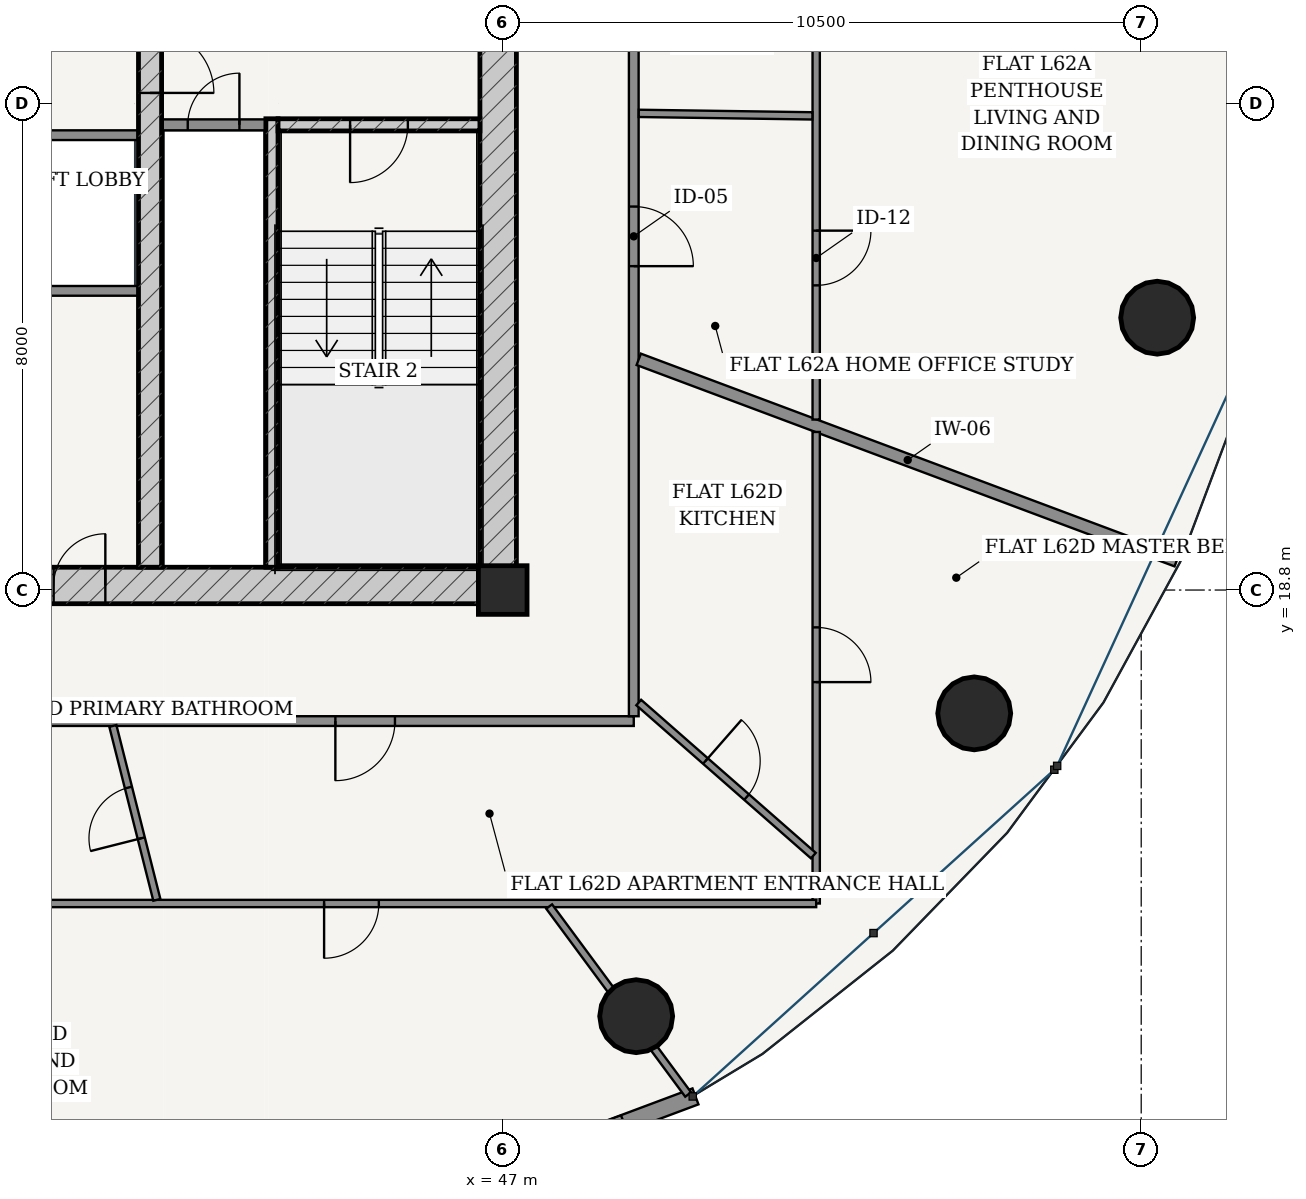
"""IFC4 building model, lengths in metres.
Left out: names, types, materials, properties, quantities, classifications, styles, units other than length and angle.
Written with IfcOpenShell. Run it as: python <this file> out.ifc"""

import sys

from ifc_helpers import new_model, si_unit, direction, frame, frame_2d, origin, origin_2d, place, context, subcontext, project, spatial, rectangle, hollow_circle, extrude, source, transform, mapped, element, fill, save


model = new_model("IFC4")
c1 = context("Model", 3, precision=1e-05, world=origin(), true_north=direction((-0.2419218956, 0.970295726276)))
c2 = subcontext(c1, "Body", "Model", "MODEL_VIEW")
j1 = project(units=[si_unit("LENGTHUNIT", "METRE"), si_unit("PLANEANGLEUNIT", "RADIAN")], contexts=[c1])
p1 = place(None, origin())
s1 = spatial("IfcSite", under=j1, at=p1, CompositionType="ELEMENT")
p2 = place(p1, origin())
s2 = spatial("IfcBuilding", under=s1, at=p2, CompositionType="ELEMENT")
p3 = place(p2, frame((0.0, 0.0, 235.6)))
s3 = spatial("IfcBuildingStorey", under=s2, at=p3, CompositionType="ELEMENT", Elevation=235.6)
p4 = place(p3, frame((47.0, 18.8, 0.0), z_axis=(0.0, 0.0, 1.0), x_axis=(1.0, 0.0, 0.0)))
e1 = element("IfcColumn", 1, at=p4, inside=s3, PredefinedType="COLUMN", context=c2, shape_type="SweptSolid", body=[
    extrude(rectangle(XDim=0.8, YDim=0.8, at=origin_2d()), origin(), (0.0, 0.0, 1.0), 3.7),
])
p5 = place(p3, frame((28.775, 18.875, 0.0), z_axis=(0.0, 0.0, 1.0), x_axis=(1.0, 0.0, 0.0)))
e2 = element("IfcWall", 2, at=p5, inside=s3, PredefinedType="SHEAR", context=c2, shape_type="SweptSolid", body=[
    extrude(rectangle(XDim=18.45, YDim=0.6, at=frame_2d((9.225, 0.0))), origin(), (0.0, 0.0, 1.0), 3.435),
])
p6 = place(p5, frame((6.76, 0.0, 0.0)))
e3 = element("IfcOpeningElement", 3, at=p6, cuts=e2, PredefinedType="OPENING", context=c2, shape_type="SweptSolid", body=[
    extrude(rectangle(XDim=0.85, YDim=2.1, at=frame_2d((0.425, 1.05))), frame((0.0, 0.31, 0.0), z_axis=(0.0, -1.0, 0.0), x_axis=(1.0, 0.0, 0.0)), (0.0, 0.0, 1.0), 0.62),
])
p7 = place(p5, frame((8.8, 0.0, 0.0)))
e4 = element("IfcOpeningElement", 4, at=p7, cuts=e2, PredefinedType="OPENING", context=c2, shape_type="SweptSolid", body=[
    extrude(rectangle(XDim=0.85, YDim=2.1, at=frame_2d((0.425, 1.05))), frame((0.0, 0.31, 0.0), z_axis=(0.0, -1.0, 0.0), x_axis=(1.0, 0.0, 0.0)), (0.0, 0.0, 1.0), 0.62),
])
p8 = place(p5, frame((10.84, 0.0, 0.0)))
e5 = element("IfcOpeningElement", 5, at=p8, cuts=e2, PredefinedType="OPENING", context=c2, shape_type="SweptSolid", body=[
    extrude(rectangle(XDim=0.85, YDim=2.1, at=frame_2d((0.425, 1.05))), frame((0.0, 0.31, 0.0), z_axis=(0.0, -1.0, 0.0), x_axis=(1.0, 0.0, 0.0)), (0.0, 0.0, 1.0), 0.62),
])
p9 = place(p3, frame((46.925, 19.175, 0.0), z_axis=(0.0, 0.0, 1.0), x_axis=(0.0, 1.0, 0.0)))
e6 = element("IfcWall", 6, at=p9, inside=s3, PredefinedType="SHEAR", context=c2, shape_type="SweptSolid", body=[
    extrude(rectangle(XDim=15.25, YDim=0.6, at=frame_2d((7.625, 0.0))), origin(), (0.0, 0.0, 1.0), 3.435),
])
p10 = place(p9, frame((9.875, 0.0, 0.0)))
e7 = element("IfcOpeningElement", 7, at=p10, cuts=e6, PredefinedType="OPENING", context=c2, shape_type="SweptSolid", body=[
    extrude(rectangle(XDim=1.5, YDim=2.2, at=frame_2d((0.75, 1.1))), frame((0.0, 0.31, 0.0), z_axis=(0.0, -1.0, 0.0), x_axis=(1.0, 0.0, 0.0)), (0.0, 0.0, 1.0), 0.62),
])
p11 = place(p3, frame((43.205, 19.175, 0.0), z_axis=(0.0, 0.0, 1.0), x_axis=(0.0, 1.0, 0.0)))
e8 = element("IfcWall", 8, at=p11, inside=s3, PredefinedType="SOLIDWALL", context=c2, shape_type="SweptSolid", body=[
    extrude(rectangle(XDim=7.375, YDim=0.2, at=frame_2d((3.688, 0.0))), origin(), (0.0, 0.0, 1.0), 3.435),
])
p12 = place(p3, frame((43.305, 26.45, 0.0), z_axis=(0.0, 0.0, 1.0), x_axis=(1.0, 0.0, 0.0)))
e9 = element("IfcWall", 9, at=p12, inside=s3, PredefinedType="SOLIDWALL", context=c2, shape_type="SweptSolid", body=[
    extrude(rectangle(XDim=3.32, YDim=0.2, at=frame_2d((1.66, 0.0))), origin(), (0.0, 0.0, 1.0), 3.435),
])
p13 = place(p12, frame((1.185, 0.0, 0.0)))
e10 = element("IfcOpeningElement", 10, at=p13, cuts=e9, PredefinedType="OPENING", context=c2, shape_type="SweptSolid", body=[
    extrude(rectangle(XDim=0.95, YDim=2.15, at=frame_2d((0.475, 1.075))), frame((0.0, 0.11, 0.0), z_axis=(0.0, -1.0, 0.0), x_axis=(1.0, 0.0, 0.0)), (0.0, 0.0, 1.0), 0.22),
])
p14 = place(p3, frame((41.2, 19.175, 0.0), z_axis=(0.0, 0.0, 1.0), x_axis=(0.0, 1.0, 0.0)))
e11 = element("IfcWall", 11, at=p14, inside=s3, PredefinedType="SHEAR", context=c2, shape_type="SweptSolid", body=[
    extrude(rectangle(XDim=15.25, YDim=0.38, at=frame_2d((7.625, 0.0))), origin(), (0.0, 0.0, 1.0), 3.435),
])
p15 = place(p14, frame((7.8, 0.0, 0.0)))
e12 = element("IfcOpeningElement", 12, at=p15, cuts=e11, PredefinedType="OPENING", context=c2, shape_type="SweptSolid", body=[
    extrude(rectangle(XDim=1.05, YDim=2.15, at=frame_2d((0.525, 1.075))), frame((0.0, 0.2, 0.0), z_axis=(0.0, -1.0, 0.0), x_axis=(1.0, 0.0, 0.0)), (0.0, 0.0, 1.0), 0.4),
])
for number, where, z_axis, x_axis in (
    (13, (49.195, 11.792, 0.0), (0.0, 0.0, 1.0), (1.0, 0.0, 0.0)),
    (14, (54.754, 16.772, 0.0), (0.0, 0.0, 1.0), (1.0, 0.0, 0.0)),
    (15, (57.763, 23.279, 0.0), (0.0, 0.0, 1.0), (1.0, 0.0, 0.0)),
):
    element("IfcColumn", number, at=place(p3, frame(where, z_axis=z_axis, x_axis=x_axis)), inside=s3, PredefinedType="COLUMN", context=c2, shape_type="SweptSolid", body=[
        extrude(hollow_circle(Radius=0.6, WallThickness=0.038, at=origin_2d()), origin(), (0.0, 0.0, 1.0), 3.7),
    ])
p16 = place(p3, frame((42.172, 7.48, 0.0), z_axis=(0.0, 0.0, 1.0), x_axis=(0.936556918375, 0.350515532672, 0.0)))
e16 = element("IfcWall", 16, at=p16, inside=s3, PredefinedType="SOLIDWALL", context=c2, shape_type="SweptSolid", body=[
    extrude(rectangle(XDim=8.539, YDim=0.28, at=frame_2d((4.27, 0.0))), origin(), (0.0, 0.0, 1.0), 3.435),
])
p17 = place(p16, frame((1.256, 0.0, 0.85)))
e17 = element("IfcOpeningElement", 17, at=p17, cuts=e16, PredefinedType="OPENING", context=c2, shape_type="SweptSolid", body=[
    extrude(rectangle(XDim=2.1, YDim=1.95, at=frame_2d((1.05, 0.975))), frame((0.0, 0.15, 0.0), z_axis=(0.0, -1.0, 0.0), x_axis=(1.0, 0.0, 0.0)), (0.0, 0.0, 1.0), 0.3),
])
p18 = place(p16, frame((5.184, 0.0, 0.85)))
e18 = element("IfcOpeningElement", 18, at=p18, cuts=e16, PredefinedType="OPENING", context=c2, shape_type="SweptSolid", body=[
    extrude(rectangle(XDim=2.1, YDim=1.95, at=frame_2d((1.05, 0.975))), frame((0.0, 0.15, 0.0), z_axis=(0.0, -1.0, 0.0), x_axis=(1.0, 0.0, 0.0)), (0.0, 0.0, 1.0), 0.3),
])
p19 = place(p3, frame((41.39, 26.45, 0.0), z_axis=(0.0, 0.0, 1.0), x_axis=(1.0, 0.0, 0.0)))
e19 = element("IfcWall", 19, at=p19, inside=s3, PredefinedType="PARTITIONING", context=c2, shape_type="SweptSolid", body=[
    extrude(rectangle(XDim=1.71, YDim=0.18, at=frame_2d((0.855, 0.0))), origin(), (0.0, 0.0, 1.0), 3.435),
])
p20 = place(p19, frame((0.43, 0.0, 0.0)))
e20 = element("IfcOpeningElement", 20, at=p20, cuts=e19, PredefinedType="OPENING", context=c2, shape_type="SweptSolid", body=[
    extrude(rectangle(XDim=0.85, YDim=2.1, at=frame_2d((0.425, 1.05))), frame((0.0, 0.1, 0.0), z_axis=(0.0, -1.0, 0.0), x_axis=(1.0, 0.0, 0.0)), (0.0, 0.0, 1.0), 0.2),
])
p21 = place(p3, frame((34.99, 26.28, 0.0), z_axis=(0.0, 0.0, 1.0), x_axis=(1.0, 0.0, 0.0)))
e21 = element("IfcWall", 21, at=p21, inside=s3, PredefinedType="PARTITIONING", context=c2, shape_type="SweptSolid", body=[
    extrude(rectangle(XDim=6.02, YDim=0.16, at=frame_2d((3.01, 0.0))), origin(), (0.0, 0.0, 1.0), 3.435),
])
p22 = place(p21, frame((0.225, 0.0, 0.0)))
e22 = element("IfcOpeningElement", 22, at=p22, cuts=e21, PredefinedType="OPENING", context=c2, shape_type="SweptSolid", body=[
    extrude(rectangle(XDim=1.1, YDim=2.2, at=frame_2d((0.55, 1.1))), frame((0.0, 0.09, 0.0), z_axis=(0.0, -1.0, 0.0), x_axis=(1.0, 0.0, 0.0)), (0.0, 0.0, 1.0), 0.18),
])
p23 = place(p21, frame((1.705, 0.0, 0.0)))
e23 = element("IfcOpeningElement", 23, at=p23, cuts=e21, PredefinedType="OPENING", context=c2, shape_type="SweptSolid", body=[
    extrude(rectangle(XDim=1.1, YDim=2.2, at=frame_2d((0.55, 1.1))), frame((0.0, 0.09, 0.0), z_axis=(0.0, -1.0, 0.0), x_axis=(1.0, 0.0, 0.0)), (0.0, 0.0, 1.0), 0.18),
])
p24 = place(p3, frame((34.99, 23.72, 0.0), z_axis=(0.0, 0.0, 1.0), x_axis=(1.0, 0.0, 0.0)))
e24 = element("IfcWall", 24, at=p24, inside=s3, PredefinedType="PARTITIONING", context=c2, shape_type="SweptSolid", body=[
    extrude(rectangle(XDim=6.02, YDim=0.16, at=frame_2d((3.01, 0.0))), origin(), (0.0, 0.0, 1.0), 3.435),
])
p25 = place(p3, frame((34.32, 16.645, 0.0), z_axis=(0.0, 0.0, 1.0), x_axis=(1.0, 0.0, 0.0)))
e25 = element("IfcWall", 25, at=p25, inside=s3, PredefinedType="PARTITIONING", context=c2, shape_type="SweptSolid", body=[
    extrude(rectangle(XDim=14.835, YDim=0.16, at=frame_2d((7.417, 0.0))), origin(), (0.0, 0.0, 1.0), 2.951),
])
p26 = place(p25, frame((9.928, 0.0, 0.0)))
e26 = element("IfcOpeningElement", 26, at=p26, cuts=e25, PredefinedType="OPENING", context=c2, shape_type="SweptSolid", body=[
    extrude(rectangle(XDim=0.98, YDim=2.2, at=frame_2d((0.49, 1.1))), frame((0.0, 0.09, 0.0), z_axis=(0.0, -1.0, 0.0), x_axis=(1.0, 0.0, 0.0)), (0.0, 0.0, 1.0), 0.18),
])
p27 = place(p3, frame((49.155, 16.725, 0.0), z_axis=(0.0, 0.0, 1.0), x_axis=(0.0, 1.0, 0.0)))
e27 = element("IfcWall", 27, at=p27, inside=s3, PredefinedType="PARTITIONING", context=c2, shape_type="SweptSolid", body=[
    extrude(rectangle(XDim=18.3, YDim=0.16, at=frame_2d((9.15, 0.0))), origin(), (0.0, 0.0, 1.0), 2.951),
])
p28 = place(p27, frame((7.401, 0.0, 0.0)))
e28 = element("IfcOpeningElement", 28, at=p28, cuts=e27, PredefinedType="OPENING", context=c2, shape_type="SweptSolid", body=[
    extrude(rectangle(XDim=0.98, YDim=2.2, at=frame_2d((0.49, 1.1))), frame((0.0, 0.09, 0.0), z_axis=(0.0, -1.0, 0.0), x_axis=(1.0, 0.0, 0.0)), (0.0, 0.0, 1.0), 0.18),
])
p29 = place(p3, frame((49.237, 22.594, 0.0), z_axis=(0.0, 0.0, 1.0), x_axis=(0.936534016635, -0.350576718687, 0.0)))
e29 = element("IfcWall", 29, at=p29, inside=s3, PredefinedType="PARTITIONING", context=c2, shape_type="SweptSolid", body=[
    extrude(rectangle(XDim=9.446, YDim=0.2, at=frame_2d((4.723, 0.0))), origin(), (0.0, 0.0, 1.0), 2.951),
])
p30 = place(p3, frame((52.155, 38.105, 0.0), z_axis=(0.0, 0.0, 1.0), x_axis=(0.0, -1.0, 0.0)))
e30 = element("IfcWall", 30, at=p30, inside=s3, PredefinedType="PARTITIONING", context=c2, shape_type="SweptSolid", body=[
    extrude(rectangle(XDim=16.501, YDim=0.12, at=frame_2d((8.251, 0.0))), origin(), (0.0, 0.0, 1.0), 2.951),
])
p31 = place(p30, frame((13.395, 0.0, 0.0)))
e31 = element("IfcOpeningElement", 31, at=p31, cuts=e30, PredefinedType="OPENING", context=c2, shape_type="SweptSolid", body=[
    extrude(rectangle(XDim=0.9, YDim=2.15, at=frame_2d((0.45, 1.075))), frame((0.0, 0.07, 0.0), z_axis=(0.0, -1.0, 0.0), x_axis=(1.0, 0.0, 0.0)), (0.0, 0.0, 1.0), 0.14),
])
p32 = place(p30, frame((7.467, 0.0, 0.0)))
e32 = element("IfcOpeningElement", 32, at=p32, cuts=e30, PredefinedType="OPENING", context=c2, shape_type="SweptSolid", body=[
    extrude(rectangle(XDim=0.9, YDim=2.15, at=frame_2d((0.45, 1.075))), frame((0.0, 0.07, 0.0), z_axis=(0.0, -1.0, 0.0), x_axis=(1.0, 0.0, 0.0)), (0.0, 0.0, 1.0), 0.14),
])
p33 = place(p3, frame((49.237, 26.639, 0.0), z_axis=(0.0, 0.0, 1.0), x_axis=(0.999896890624, -0.014359948506, 0.0)))
e33 = element("IfcWall", 33, at=p33, inside=s3, PredefinedType="PARTITIONING", context=c2, shape_type="SweptSolid", body=[
    extrude(rectangle(XDim=2.856, YDim=0.12, at=frame_2d((1.428, 0.0))), origin(), (0.0, 0.0, 1.0), 3.435),
])
p34 = place(p3, frame((52.155, 21.4, 0.0), z_axis=(0.0, 0.0, 1.0), x_axis=(0.0, -1.0, 0.0)))
e34 = element("IfcWall", 34, at=p34, inside=s3, PredefinedType="PARTITIONING", context=c2, shape_type="SweptSolid", body=[
    extrude(rectangle(XDim=7.755, YDim=0.12, at=frame_2d((3.877, 0.0))), origin(), (0.0, 0.0, 1.0), 2.951),
])
p35 = place(p34, frame((3.214, 0.0, 0.0)))
e35 = element("IfcOpeningElement", 35, at=p35, cuts=e34, PredefinedType="OPENING", context=c2, shape_type="SweptSolid", body=[
    extrude(rectangle(XDim=0.9, YDim=2.15, at=frame_2d((0.45, 1.075))), frame((0.0, 0.07, 0.0), z_axis=(0.0, -1.0, 0.0), x_axis=(1.0, 0.0, 0.0)), (0.0, 0.0, 1.0), 0.14),
])
p36 = place(p3, frame((52.155, 13.645, 0.0), z_axis=(0.0, 0.0, 1.0), x_axis=(-1.0, 0.0, 0.0)))
e36 = element("IfcWall", 36, at=p36, inside=s3, PredefinedType="PARTITIONING", context=c2, shape_type="SweptSolid", body=[
    extrude(rectangle(XDim=16.949, YDim=0.12, at=frame_2d((8.474, 0.0))), origin(), (0.0, 0.0, 1.0), 2.951),
])
p37 = place(p36, frame((7.192, 0.0, 0.0)))
e37 = element("IfcOpeningElement", 37, at=p37, cuts=e36, PredefinedType="OPENING", context=c2, shape_type="SweptSolid", body=[
    extrude(rectangle(XDim=0.9, YDim=2.15, at=frame_2d((0.45, 1.075))), frame((0.0, 0.07, 0.0), z_axis=(0.0, -1.0, 0.0), x_axis=(1.0, 0.0, 0.0)), (0.0, 0.0, 1.0), 0.14),
])
p38 = place(p3, frame((47.764, 13.595, 0.0), z_axis=(0.0, 0.0, 1.0), x_axis=(0.594530312724, -0.804073197696, 0.0)))
e38 = element("IfcWall", 38, at=p38, inside=s3, PredefinedType="PARTITIONING", context=c2, shape_type="SweptSolid", body=[
    extrude(rectangle(XDim=3.845, YDim=0.12, at=frame_2d((1.922, 0.0))), origin(), (0.0, 0.0, 1.0), 2.951),
])
p39 = place(p3, frame((40.589, 16.565, 0.0), z_axis=(0.0, 0.0, 1.0), x_axis=(0.245222005641, -0.969466950416, 0.0)))
e39 = element("IfcWall", 39, at=p39, inside=s3, PredefinedType="PARTITIONING", context=c2, shape_type="SweptSolid", body=[
    extrude(rectangle(XDim=2.95, YDim=0.12, at=frame_2d((1.475, 0.0))), origin(), (0.0, 0.0, 1.0), 3.11),
])
p40 = place(p39, frame((1.045, 0.0, 0.0)))
e40 = element("IfcOpeningElement", 40, at=p40, cuts=e39, PredefinedType="OPENING", context=c2, shape_type="SweptSolid", body=[
    extrude(rectangle(XDim=0.86, YDim=2.15, at=frame_2d((0.43, 1.075))), frame((0.0, 0.07, 0.0), z_axis=(0.0, -1.0, 0.0), x_axis=(1.0, 0.0, 0.0)), (0.0, 0.0, 1.0), 0.14),
])
p41 = place(p3, frame((49.237, 16.95, 0.0), z_axis=(0.0, 0.0, 1.0), x_axis=(0.751994252696, -0.659169662463, 0.0)))
e41 = element("IfcWall", 41, at=p41, inside=s3, PredefinedType="PARTITIONING", context=c2, shape_type="SweptSolid", body=[
    extrude(rectangle(XDim=3.819, YDim=0.12, at=frame_2d((1.909, 0.0))), origin(), (0.0, 0.0, 1.0), 2.951),
])
p42 = place(p41, frame((1.459, 0.0, 0.0)))
e42 = element("IfcOpeningElement", 42, at=p42, cuts=e41, PredefinedType="OPENING", context=c2, shape_type="SweptSolid", body=[
    extrude(rectangle(XDim=0.9, YDim=2.15, at=frame_2d((0.45, 1.075))), frame((0.0, 0.07, 0.0), z_axis=(0.0, -1.0, 0.0), x_axis=(1.0, 0.0, 0.0)), (0.0, 0.0, 1.0), 0.14),
])
m1 = source(origin(), c2, "Body", "SweptSolid", [
    extrude(rectangle(XDim=1.05, YDim=2.15, at=frame_2d((0.525, 1.075))), frame((0.0, 0.025, 0.0), z_axis=(0.0, -1.0, 0.0), x_axis=(1.0, 0.0, 0.0)), (0.0, 0.0, 1.0), 0.05),
])
p43 = place(p15, frame((1.05, 0.0, 0.0), z_axis=(0.0, 0.0, 1.0), x_axis=(-1.0, 0.0, 0.0)))
e43 = element("IfcDoor", 43, at=p43, inside=s3, OperationType="SINGLE_SWING_RIGHT", PredefinedType="DOOR", context=c2, shape_type="MappedRepresentation", body=[
    mapped(m1, transform((0.0, 0.0, 0.0), scale=1.0)),
])
fill(e12, e43)
m2 = source(origin(), c2, "Body", "SweptSolid", [
    extrude(rectangle(XDim=0.95, YDim=2.15, at=frame_2d((0.475, 1.075))), frame((0.0, 0.025, 0.0), z_axis=(0.0, -1.0, 0.0), x_axis=(1.0, 0.0, 0.0)), (0.0, 0.0, 1.0), 0.05),
])
p44 = place(p13, frame((0.95, 0.0, 0.0), z_axis=(0.0, 0.0, 1.0), x_axis=(-1.0, 0.0, 0.0)))
e44 = element("IfcDoor", 44, at=p44, inside=s3, OperationType="SINGLE_SWING_RIGHT", PredefinedType="DOOR", context=c2, shape_type="MappedRepresentation", body=[
    mapped(m2, transform((0.0, 0.0, 0.0), scale=1.0)),
])
fill(e10, e44)
m3 = source(origin(), c2, "Body", "SweptSolid", [
    extrude(rectangle(XDim=0.85, YDim=2.1, at=frame_2d((0.425, 1.05))), frame((0.0, 0.025, 0.0), z_axis=(0.0, -1.0, 0.0), x_axis=(1.0, 0.0, 0.0)), (0.0, 0.0, 1.0), 0.05),
])
p45 = place(p20, origin())
e45 = element("IfcDoor", 45, at=p45, inside=s3, OperationType="SINGLE_SWING_RIGHT", PredefinedType="DOOR", context=c2, shape_type="MappedRepresentation", body=[
    mapped(m3, transform((0.0, 0.0, 0.0), scale=1.0)),
])
fill(e20, e45)
p46 = place(p8, origin())
e46 = element("IfcDoor", 46, at=p46, inside=s3, OperationType="SINGLE_SWING_RIGHT", PredefinedType="DOOR", context=c2, shape_type="MappedRepresentation", body=[
    mapped(m3, transform((0.0, 0.0, 0.0), scale=1.0)),
])
fill(e5, e46)
m4 = source(origin(), c2, "Body", "SweptSolid", [
    extrude(rectangle(XDim=0.98, YDim=2.2, at=frame_2d((0.49, 1.1))), frame((0.0, 0.025, 0.0), z_axis=(0.0, -1.0, 0.0), x_axis=(1.0, 0.0, 0.0)), (0.0, 0.0, 1.0), 0.05),
])
p47 = place(p28, frame((0.98, 0.0, 0.0), z_axis=(0.0, 0.0, 1.0), x_axis=(-1.0, 0.0, 0.0)))
e47 = element("IfcDoor", 47, at=p47, inside=s3, OperationType="SINGLE_SWING_RIGHT", PredefinedType="DOOR", context=c2, shape_type="MappedRepresentation", body=[
    mapped(m4, transform((0.0, 0.0, 0.0), scale=1.0)),
])
fill(e28, e47)
m5 = source(origin(), c2, "Body", "SweptSolid", [
    extrude(rectangle(XDim=0.9, YDim=2.15, at=frame_2d((0.45, 1.075))), frame((0.0, 0.025, 0.0), z_axis=(0.0, -1.0, 0.0), x_axis=(1.0, 0.0, 0.0)), (0.0, 0.0, 1.0), 0.05),
])
p48 = place(p31, origin())
e48 = element("IfcDoor", 48, at=p48, inside=s3, OperationType="SINGLE_SWING_LEFT", PredefinedType="DOOR", context=c2, shape_type="MappedRepresentation", body=[
    mapped(m5, transform((0.0, 0.0, 0.0), scale=1.0)),
])
fill(e31, e48)
p49 = place(p26, frame((0.98, 0.0, 0.0), z_axis=(0.0, 0.0, 1.0), x_axis=(-1.0, 0.0, 0.0)))
e49 = element("IfcDoor", 49, at=p49, inside=s3, OperationType="SINGLE_SWING_RIGHT", PredefinedType="DOOR", context=c2, shape_type="MappedRepresentation", body=[
    mapped(m4, transform((0.0, 0.0, 0.0), scale=1.0)),
])
fill(e26, e49)
m6 = source(origin(), c2, "Body", "SweptSolid", [
    extrude(rectangle(XDim=0.86, YDim=2.15, at=frame_2d((0.43, 1.075))), frame((0.0, 0.025, 0.0), z_axis=(0.0, -1.0, 0.0), x_axis=(1.0, 0.0, 0.0)), (0.0, 0.0, 1.0), 0.05),
])
p50 = place(p40, frame((0.86, 0.0, 0.0), z_axis=(0.0, 0.0, 1.0), x_axis=(-1.0, 0.0, 0.0)))
e50 = element("IfcDoor", 50, at=p50, inside=s3, OperationType="SINGLE_SWING_LEFT", PredefinedType="DOOR", context=c2, shape_type="MappedRepresentation", body=[
    mapped(m6, transform((0.0, 0.0, 0.0), scale=1.0)),
])
fill(e40, e50)
p51 = place(p37, origin())
e51 = element("IfcDoor", 51, at=p51, inside=s3, OperationType="SINGLE_SWING_RIGHT", PredefinedType="DOOR", context=c2, shape_type="MappedRepresentation", body=[
    mapped(m5, transform((0.0, 0.0, 0.0), scale=1.0)),
])
fill(e37, e51)
p52 = place(p42, origin())
e52 = element("IfcDoor", 52, at=p52, inside=s3, OperationType="SINGLE_SWING_LEFT", PredefinedType="DOOR", context=c2, shape_type="MappedRepresentation", body=[
    mapped(m5, transform((0.0, 0.0, 0.0), scale=1.0)),
])
fill(e42, e52)
p53 = place(p35, origin())
e53 = element("IfcDoor", 53, at=p53, inside=s3, OperationType="SINGLE_SWING_RIGHT", PredefinedType="DOOR", context=c2, shape_type="MappedRepresentation", body=[
    mapped(m5, transform((0.0, 0.0, 0.0), scale=1.0)),
])
fill(e35, e53)
save(model, sys.argv[1])
